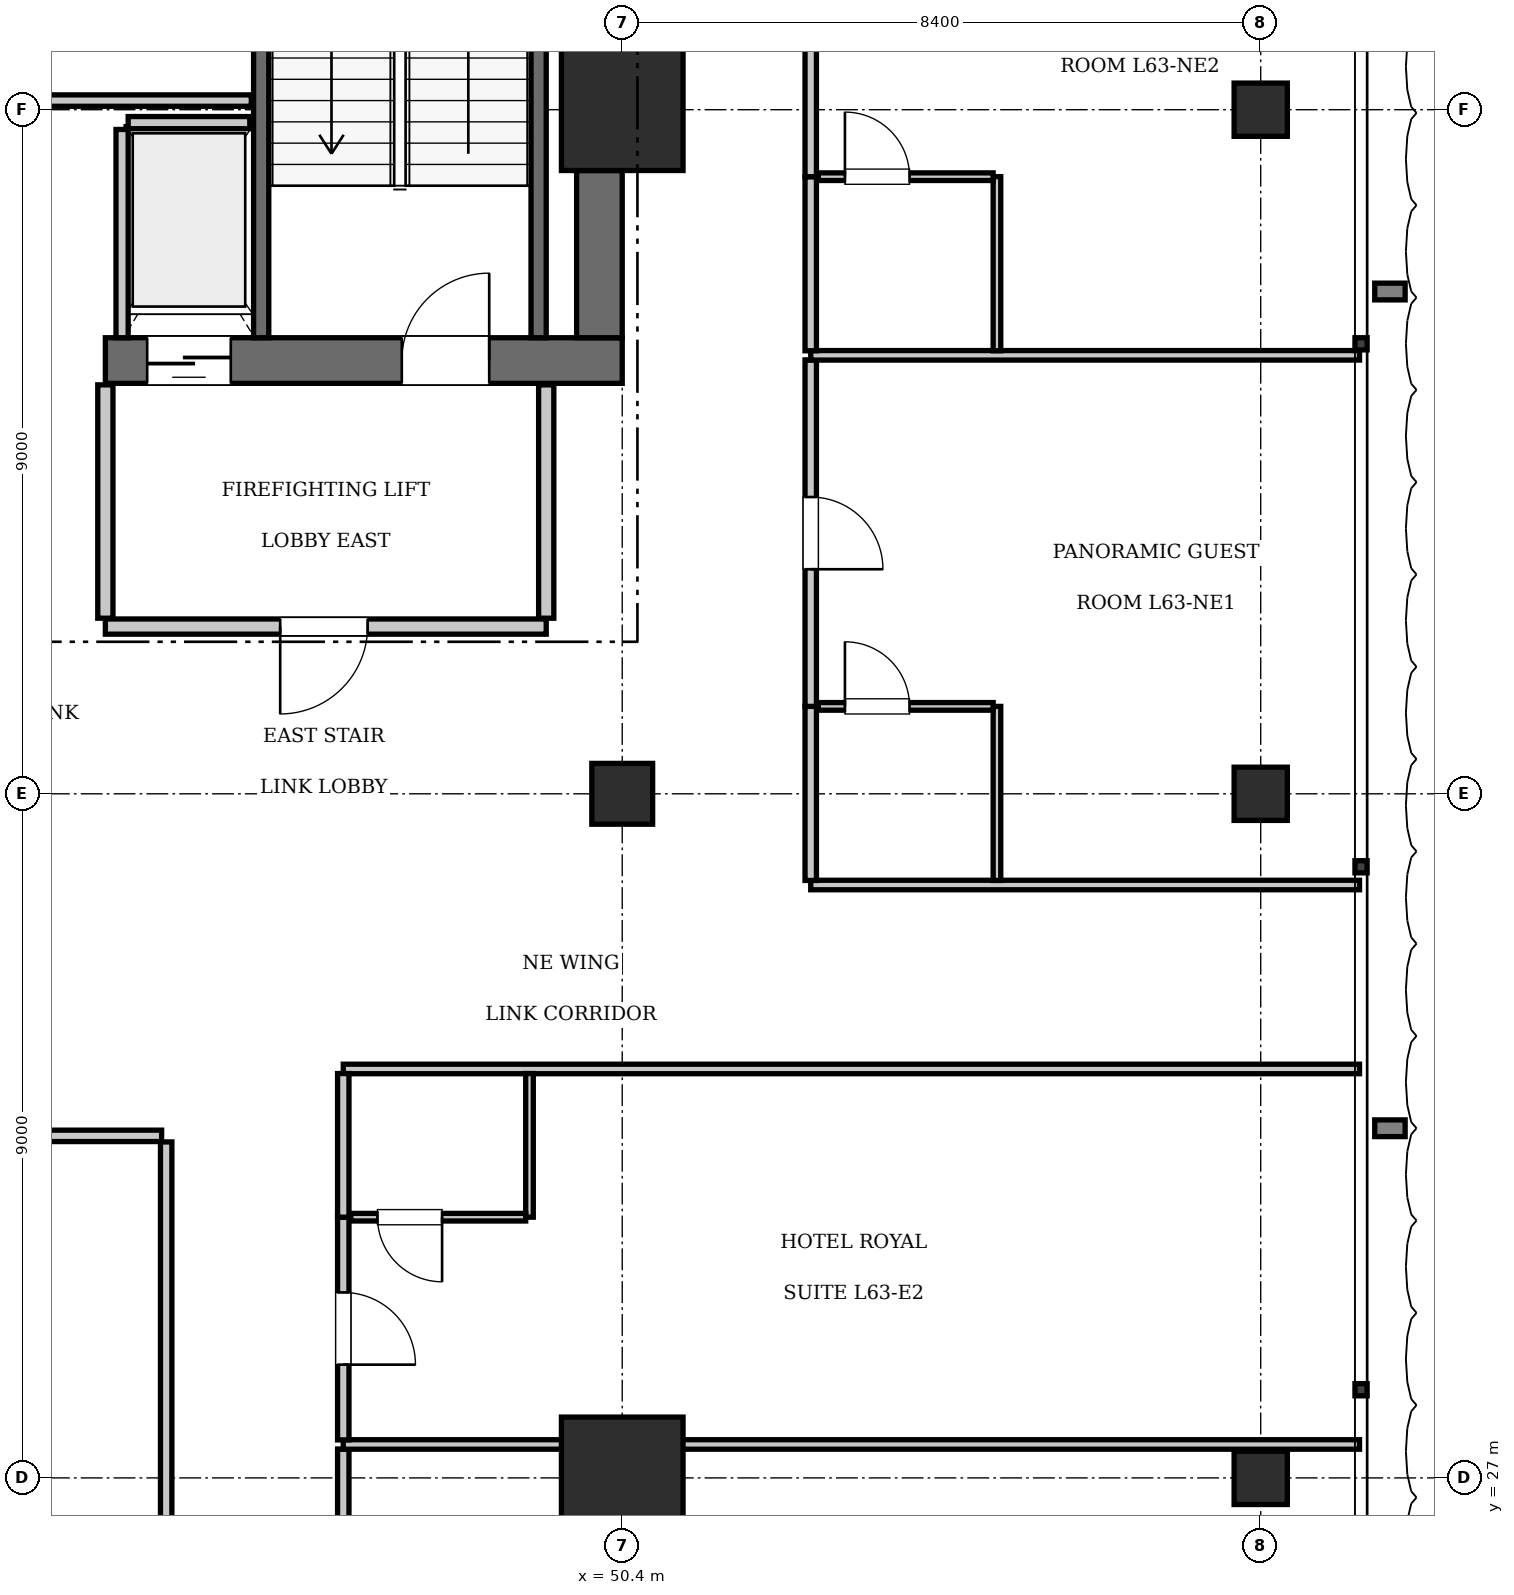
"""IFC4 building model, lengths in metres.
Left out: names, types, materials, properties, quantities, classifications, styles, units other than length and angle.
Written with IfcOpenShell. Run it as: python <this file> out.ifc"""

import sys

from ifc_helpers import new_model, si_unit, direction, frame, frame_2d, origin, origin_2d, place, context, subcontext, project, spatial, rectangle, extrude, element, fill, save


model = new_model("IFC4")
c1 = context("Model", 3, precision=1e-05, world=origin(), true_north=direction((0.0, 1.0)))
c2 = subcontext(c1, "Body", "Model", "MODEL_VIEW")
j1 = project(units=[si_unit("LENGTHUNIT", "METRE"), si_unit("PLANEANGLEUNIT", "RADIAN")], contexts=[c1])
p1 = place(None, origin())
s1 = spatial("IfcSite", under=j1, at=p1, CompositionType="ELEMENT")
p2 = place(p1, origin())
s2 = spatial("IfcBuilding", under=s1, at=p2, CompositionType="ELEMENT")
p3 = place(p2, frame((0.0, 0.0, 258.65)))
s3 = spatial("IfcBuildingStorey", under=s2, at=p3, CompositionType="ELEMENT", Elevation=258.65)
for number, where, z_axis, x_axis in (
    (1, (50.4, 27.0, 0.0), (0.0, 0.0, 1.0), (1.0, 0.0, 0.0)),
    (2, (50.4, 45.0, 0.0), (0.0, 0.0, 1.0), (1.0, 0.0, 0.0)),
):
    element("IfcColumn", number, at=place(p3, frame(where, z_axis=z_axis, x_axis=x_axis)), inside=s3, PredefinedType="COLUMN", context=c2, shape_type="SweptSolid", body=[
        extrude(rectangle(XDim=1.6, YDim=1.6, at=origin_2d()), origin(), (0.0, 0.0, 1.0), 3.85),
    ])
p4 = place(p3, frame((43.6, 41.7, 0.0), z_axis=(0.0, 0.0, 1.0), x_axis=(1.0, 0.0, 0.0)))
e3 = element("IfcWall", 3, at=p4, inside=s3, PredefinedType="SHEAR", context=c2, shape_type="SweptSolid", body=[
    extrude(rectangle(XDim=6.8, YDim=0.6, at=frame_2d((3.4, 0.0))), origin(), (0.0, 0.0, 1.0), 3.85),
])
p5 = place(p4, frame((3.9, 0.0, 0.0)))
e4 = element("IfcOpeningElement", 4, at=p5, cuts=e3, PredefinedType="OPENING", context=c2, shape_type="SweptSolid", body=[
    extrude(rectangle(XDim=1.15, YDim=2.15, at=frame_2d((0.575, 1.075))), frame((0.0, 0.31, 0.0), z_axis=(0.0, -1.0, 0.0), x_axis=(1.0, 0.0, 0.0)), (0.0, 0.0, 1.0), 0.62),
])
p6 = place(p4, frame((0.55, 0.0, 0.0)))
e5 = element("IfcOpeningElement", 5, at=p6, cuts=e3, PredefinedType="OPENING", context=c2, shape_type="SweptSolid", body=[
    extrude(rectangle(XDim=1.1, YDim=2.2, at=frame_2d((0.55, 1.1))), frame((0.0, 0.31, 0.0), z_axis=(0.0, -1.0, 0.0), x_axis=(1.0, 0.0, 0.0)), (0.0, 0.0, 1.0), 0.62),
])
p7 = place(p3, frame((50.1, 42.0, 0.0), z_axis=(0.0, 0.0, 1.0), x_axis=(0.0, 1.0, 0.0)))
e6 = element("IfcWall", 6, at=p7, inside=s3, PredefinedType="SHEAR", context=c2, shape_type="SweptSolid", body=[
    extrude(rectangle(XDim=2.2, YDim=0.6, at=frame_2d((1.1, 0.0))), origin(), (0.0, 0.0, 1.0), 3.85),
])
p8 = place(p3, frame((50.4, 36.0, 0.0), z_axis=(0.0, 0.0, 1.0), x_axis=(1.0, 0.0, 0.0)))
e7 = element("IfcColumn", 7, at=p8, inside=s3, PredefinedType="COLUMN", context=c2, shape_type="SweptSolid", body=[
    extrude(rectangle(XDim=0.8, YDim=0.8, at=origin_2d()), origin(), (0.0, 0.0, 1.0), 3.85),
])
for number, where, z_axis, x_axis in (
    (8, (58.8, 27.0, 0.0), (0.0, 0.0, 1.0), (1.0, 0.0, 0.0)),
    (9, (58.8, 36.0, 0.0), (0.0, 0.0, 1.0), (1.0, 0.0, 0.0)),
    (10, (58.8, 45.0, 0.0), (0.0, 0.0, 1.0), (1.0, 0.0, 0.0)),
):
    element("IfcColumn", number, at=place(p3, frame(where, z_axis=z_axis, x_axis=x_axis)), inside=s3, PredefinedType="COLUMN", context=c2, shape_type="SweptSolid", body=[
        extrude(rectangle(XDim=0.7, YDim=0.7, at=origin_2d()), origin(), (0.0, 0.0, 1.0), 3.85),
    ])
p9 = place(p3, frame((45.65, 42.0, 0.0), z_axis=(0.0, 0.0, 1.0), x_axis=(0.0, 1.0, 0.0)))
e11 = element("IfcWall", 11, at=p9, inside=s3, PredefinedType="SOLIDWALL", context=c2, shape_type="SweptSolid", body=[
    extrude(rectangle(XDim=9.15, YDim=0.2, at=frame_2d((4.575, 0.0))), origin(), (0.0, 0.0, 1.0), 3.61),
])
p10 = place(p3, frame((49.3, 42.0, 0.0), z_axis=(0.0, 0.0, 1.0), x_axis=(0.0, 1.0, 0.0)))
e12 = element("IfcWall", 12, at=p10, inside=s3, PredefinedType="SOLIDWALL", context=c2, shape_type="SweptSolid", body=[
    extrude(rectangle(XDim=9.12, YDim=0.2, at=frame_2d((4.56, 0.0))), origin(), (0.0, 0.0, 1.0), 3.61),
])
p11 = place(p3, frame((43.9, 44.83, 0.0), z_axis=(0.0, 0.0, 1.0), x_axis=(1.0, 0.0, 0.0)))
e13 = element("IfcWall", 13, at=p11, inside=s3, PredefinedType="SOLIDWALL", context=c2, shape_type="SweptSolid", body=[
    extrude(rectangle(XDim=1.6, YDim=0.16, at=frame_2d((0.8, 0.0))), origin(), (0.0, 0.0, 1.0), 3.61),
])
p12 = place(p3, frame((43.82, 42.0, 0.0), z_axis=(0.0, 0.0, 1.0), x_axis=(0.0, 1.0, 0.0)))
e14 = element("IfcWall", 14, at=p12, inside=s3, PredefinedType="SOLIDWALL", context=c2, shape_type="SweptSolid", body=[
    extrude(rectangle(XDim=2.74, YDim=0.16, at=frame_2d((1.37, 0.0))), origin(), (0.0, 0.0, 1.0), 3.61),
])
p13 = place(p3, frame((43.6, 38.2, 0.0), z_axis=(0.0, 0.0, 1.0), x_axis=(1.0, 0.0, 0.0)))
e15 = element("IfcWall", 15, at=p13, inside=s3, PredefinedType="PARTITIONING", context=c2, shape_type="SweptSolid", body=[
    extrude(rectangle(XDim=5.8, YDim=0.2, at=frame_2d((2.9, 0.0))), origin(), (0.0, 0.0, 1.0), 3.61),
])
p14 = place(p13, frame((2.3, 0.0, 0.0)))
e16 = element("IfcOpeningElement", 16, at=p14, cuts=e15, PredefinedType="OPENING", context=c2, shape_type="SweptSolid", body=[
    extrude(rectangle(XDim=1.15, YDim=2.15, at=frame_2d((0.575, 1.075))), frame((0.0, 0.11, 0.0), z_axis=(0.0, -1.0, 0.0), x_axis=(1.0, 0.0, 0.0)), (0.0, 0.0, 1.0), 0.22),
])
for number, where, z_axis, x_axis in (
    (17, (43.6, 38.31, 0.0), (0.0, 0.0, 1.0), (0.0, 1.0, 0.0)),
    (18, (49.4, 38.31, 0.0), (0.0, 0.0, 1.0), (0.0, 1.0, 0.0)),
):
    element("IfcWall", number, at=place(p3, frame(where, z_axis=z_axis, x_axis=x_axis)), inside=s3, PredefinedType="PARTITIONING", context=c2, shape_type="SweptSolid", body=[
        extrude(rectangle(XDim=3.07, YDim=0.2, at=frame_2d((1.535, 0.0))), origin(), (0.0, 0.0, 1.0), 3.61),
    ])
p15 = place(p3, frame((42.38, 45.12, 0.0), z_axis=(0.0, 0.0, 1.0), x_axis=(1.0, 0.0, 0.0)))
e19 = element("IfcWall", 19, at=p15, inside=s3, PredefinedType="PARTITIONING", context=c2, shape_type="SweptSolid", body=[
    extrude(rectangle(XDim=3.14, YDim=0.15, at=frame_2d((1.57, 0.0))), origin(), (0.0, 0.0, 1.0), 3.61),
])
p16 = place(p3, frame((44.4, 22.53, 0.0), z_axis=(0.0, 0.0, 1.0), x_axis=(0.0, 1.0, 0.0)))
e20 = element("IfcWall", 20, at=p16, inside=s3, PredefinedType="PARTITIONING", context=c2, shape_type="SweptSolid", body=[
    extrude(rectangle(XDim=8.89, YDim=0.15, at=frame_2d((4.445, 0.0))), origin(), (0.0, 0.0, 1.0), 3.61),
])
p17 = place(p3, frame((38.775, 31.5, 0.0), z_axis=(0.0, 0.0, 1.0), x_axis=(1.0, 0.0, 0.0)))
e21 = element("IfcWall", 21, at=p17, inside=s3, PredefinedType="PARTITIONING", context=c2, shape_type="SweptSolid", body=[
    extrude(rectangle(XDim=5.565, YDim=0.15, at=frame_2d((2.782, 0.0))), origin(), (0.0, 0.0, 1.0), 3.61),
])
p18 = place(p17, frame((2.332, 0.0, 0.0)))
e22 = element("IfcOpeningElement", 22, at=p18, cuts=e21, PredefinedType="OPENING", context=c2, shape_type="SweptSolid", body=[
    extrude(rectangle(XDim=0.9, YDim=2.1, at=frame_2d((0.45, 1.05))), frame((0.0, 0.085, 0.0), z_axis=(0.0, -1.0, 0.0), x_axis=(1.0, 0.0, 0.0)), (0.0, 0.0, 1.0), 0.17),
])
p19 = place(p3, frame((46.73, 32.38, 0.0), z_axis=(0.0, 0.0, 1.0), x_axis=(1.0, 0.0, 0.0)))
e23 = element("IfcWall", 23, at=p19, inside=s3, PredefinedType="PARTITIONING", context=c2, shape_type="SweptSolid", body=[
    extrude(rectangle(XDim=13.37, YDim=0.125, at=frame_2d((6.685, 0.0))), origin(), (0.0, 0.0, 1.0), 3.61),
])
p20 = place(p3, frame((46.73, 24.45, 0.0), z_axis=(0.0, 0.0, 1.0), x_axis=(0.0, 1.0, 0.0)))
e24 = element("IfcWall", 24, at=p20, inside=s3, PredefinedType="PARTITIONING", context=c2, shape_type="SweptSolid", body=[
    extrude(rectangle(XDim=2.93, YDim=0.15, at=frame_2d((1.465, 0.0))), origin(), (0.0, 0.0, 1.0), 3.61),
])
p21 = place(p20, frame((0.99, 0.0, 0.0)))
e25 = element("IfcOpeningElement", 25, at=p21, cuts=e24, PredefinedType="OPENING", context=c2, shape_type="SweptSolid", body=[
    extrude(rectangle(XDim=0.95, YDim=2.15, at=frame_2d((0.475, 1.075))), frame((0.0, 0.085, 0.0), z_axis=(0.0, -1.0, 0.0), x_axis=(1.0, 0.0, 0.0)), (0.0, 0.0, 1.0), 0.17),
])
p22 = place(p3, frame((46.73, 27.44, 0.0), z_axis=(0.0, 0.0, 1.0), x_axis=(1.0, 0.0, 0.0)))
e26 = element("IfcWall", 26, at=p22, inside=s3, PredefinedType="PARTITIONING", context=c2, shape_type="SweptSolid", body=[
    extrude(rectangle(XDim=13.37, YDim=0.125, at=frame_2d((6.685, 0.0))), origin(), (0.0, 0.0, 1.0), 3.61),
])
p23 = place(p3, frame((46.73, 27.5, 0.0), z_axis=(0.0, 0.0, 1.0), x_axis=(0.0, 1.0, 0.0)))
e27 = element("IfcWall", 27, at=p23, inside=s3, PredefinedType="PARTITIONING", context=c2, shape_type="SweptSolid", body=[
    extrude(rectangle(XDim=2.93, YDim=0.15, at=frame_2d((1.465, 0.0))), origin(), (0.0, 0.0, 1.0), 3.61),
])
p24 = place(p23, frame((0.99, 0.0, 0.0)))
e28 = element("IfcOpeningElement", 28, at=p24, cuts=e27, PredefinedType="OPENING", context=c2, shape_type="SweptSolid", body=[
    extrude(rectangle(XDim=0.95, YDim=2.15, at=frame_2d((0.475, 1.075))), frame((0.0, 0.085, 0.0), z_axis=(0.0, -1.0, 0.0), x_axis=(1.0, 0.0, 0.0)), (0.0, 0.0, 1.0), 0.17),
])
p25 = place(p3, frame((46.73, 30.43, 0.0), z_axis=(0.0, 0.0, 1.0), x_axis=(0.0, 1.0, 0.0)))
e29 = element("IfcWall", 29, at=p25, inside=s3, PredefinedType="PARTITIONING", context=c2, shape_type="SweptSolid", body=[
    extrude(rectangle(XDim=1.89, YDim=0.15, at=frame_2d((0.945, 0.0))), origin(), (0.0, 0.0, 1.0), 3.61),
])
p26 = place(p3, frame((49.18, 30.43, 0.0), z_axis=(0.0, 0.0, 1.0), x_axis=(0.0, 1.0, 0.0)))
e30 = element("IfcWall", 30, at=p26, inside=s3, PredefinedType="PARTITIONING", context=c2, shape_type="SweptSolid", body=[
    extrude(rectangle(XDim=1.89, YDim=0.1, at=frame_2d((0.945, 0.0))), origin(), (0.0, 0.0, 1.0), 3.61),
])
p27 = place(p3, frame((46.83, 30.43, 0.0), z_axis=(0.0, 0.0, 1.0), x_axis=(1.0, 0.0, 0.0)))
e31 = element("IfcWall", 31, at=p27, inside=s3, PredefinedType="PARTITIONING", context=c2, shape_type="SweptSolid", body=[
    extrude(rectangle(XDim=2.3, YDim=0.1, at=frame_2d((1.15, 0.0))), origin(), (0.0, 0.0, 1.0), 3.61),
])
p28 = place(p27, frame((0.35, 0.0, 0.0)))
e32 = element("IfcOpeningElement", 32, at=p28, cuts=e31, PredefinedType="OPENING", context=c2, shape_type="SweptSolid", body=[
    extrude(rectangle(XDim=0.85, YDim=2.1, at=frame_2d((0.425, 1.05))), frame((0.0, 0.06, 0.0), z_axis=(0.0, -1.0, 0.0), x_axis=(1.0, 0.0, 0.0)), (0.0, 0.0, 1.0), 0.12),
])
p29 = place(p3, frame((52.88, 34.8, 0.0), z_axis=(0.0, 0.0, 1.0), x_axis=(1.0, 0.0, 0.0)))
e33 = element("IfcWall", 33, at=p29, inside=s3, PredefinedType="PARTITIONING", context=c2, shape_type="SweptSolid", body=[
    extrude(rectangle(XDim=7.22, YDim=0.125, at=frame_2d((3.61, 0.0))), origin(), (0.0, 0.0, 1.0), 3.61),
])
p30 = place(p3, frame((52.88, 34.86, 0.0), z_axis=(0.0, 0.0, 1.0), x_axis=(0.0, 1.0, 0.0)))
e34 = element("IfcWall", 34, at=p30, inside=s3, PredefinedType="PARTITIONING", context=c2, shape_type="SweptSolid", body=[
    extrude(rectangle(XDim=2.29, YDim=0.15, at=frame_2d((1.145, 0.0))), origin(), (0.0, 0.0, 1.0), 3.61),
])
p31 = place(p3, frame((52.88, 37.15, 0.0), z_axis=(0.0, 0.0, 1.0), x_axis=(0.0, 1.0, 0.0)))
e35 = element("IfcWall", 35, at=p31, inside=s3, PredefinedType="PARTITIONING", context=c2, shape_type="SweptSolid", body=[
    extrude(rectangle(XDim=4.559, YDim=0.15, at=frame_2d((2.279, 0.0))), origin(), (0.0, 0.0, 1.0), 3.61),
])
p32 = place(p31, frame((1.804, 0.0, 0.0)))
e36 = element("IfcOpeningElement", 36, at=p32, cuts=e35, PredefinedType="OPENING", context=c2, shape_type="SweptSolid", body=[
    extrude(rectangle(XDim=0.95, YDim=2.15, at=frame_2d((0.475, 1.075))), frame((0.0, 0.085, 0.0), z_axis=(0.0, -1.0, 0.0), x_axis=(1.0, 0.0, 0.0)), (0.0, 0.0, 1.0), 0.17),
])
p33 = place(p3, frame((55.33, 34.86, 0.0), z_axis=(0.0, 0.0, 1.0), x_axis=(0.0, 1.0, 0.0)))
e37 = element("IfcWall", 37, at=p33, inside=s3, PredefinedType="PARTITIONING", context=c2, shape_type="SweptSolid", body=[
    extrude(rectangle(XDim=2.29, YDim=0.1, at=frame_2d((1.145, 0.0))), origin(), (0.0, 0.0, 1.0), 3.61),
])
p34 = place(p3, frame((52.98, 37.15, 0.0), z_axis=(0.0, 0.0, 1.0), x_axis=(1.0, 0.0, 0.0)))
e38 = element("IfcWall", 38, at=p34, inside=s3, PredefinedType="PARTITIONING", context=c2, shape_type="SweptSolid", body=[
    extrude(rectangle(XDim=2.3, YDim=0.1, at=frame_2d((1.15, 0.0))), origin(), (0.0, 0.0, 1.0), 3.61),
])
p35 = place(p34, frame((0.35, 0.0, 0.0)))
e39 = element("IfcOpeningElement", 39, at=p35, cuts=e38, PredefinedType="OPENING", context=c2, shape_type="SweptSolid", body=[
    extrude(rectangle(XDim=0.85, YDim=2.1, at=frame_2d((0.425, 1.05))), frame((0.0, 0.06, 0.0), z_axis=(0.0, -1.0, 0.0), x_axis=(1.0, 0.0, 0.0)), (0.0, 0.0, 1.0), 0.12),
])
p36 = place(p3, frame((52.88, 41.769, 0.0), z_axis=(0.0, 0.0, 1.0), x_axis=(1.0, 0.0, 0.0)))
e40 = element("IfcWall", 40, at=p36, inside=s3, PredefinedType="PARTITIONING", context=c2, shape_type="SweptSolid", body=[
    extrude(rectangle(XDim=7.22, YDim=0.125, at=frame_2d((3.61, 0.0))), origin(), (0.0, 0.0, 1.0), 3.61),
])
p37 = place(p3, frame((52.88, 41.829, 0.0), z_axis=(0.0, 0.0, 1.0), x_axis=(0.0, 1.0, 0.0)))
e41 = element("IfcWall", 41, at=p37, inside=s3, PredefinedType="PARTITIONING", context=c2, shape_type="SweptSolid", body=[
    extrude(rectangle(XDim=2.29, YDim=0.15, at=frame_2d((1.145, 0.0))), origin(), (0.0, 0.0, 1.0), 3.61),
])
p38 = place(p3, frame((52.88, 44.119, 0.0), z_axis=(0.0, 0.0, 1.0), x_axis=(0.0, 1.0, 0.0)))
e42 = element("IfcWall", 42, at=p38, inside=s3, PredefinedType="PARTITIONING", context=c2, shape_type="SweptSolid", body=[
    extrude(rectangle(XDim=4.559, YDim=0.15, at=frame_2d((2.279, 0.0))), origin(), (0.0, 0.0, 1.0), 3.61),
])
p39 = place(p38, frame((1.804, 0.0, 0.0)))
e43 = element("IfcOpeningElement", 43, at=p39, cuts=e42, PredefinedType="OPENING", context=c2, shape_type="SweptSolid", body=[
    extrude(rectangle(XDim=0.95, YDim=2.15, at=frame_2d((0.475, 1.075))), frame((0.0, 0.085, 0.0), z_axis=(0.0, -1.0, 0.0), x_axis=(1.0, 0.0, 0.0)), (0.0, 0.0, 1.0), 0.17),
])
p40 = place(p3, frame((55.33, 41.829, 0.0), z_axis=(0.0, 0.0, 1.0), x_axis=(0.0, 1.0, 0.0)))
e44 = element("IfcWall", 44, at=p40, inside=s3, PredefinedType="PARTITIONING", context=c2, shape_type="SweptSolid", body=[
    extrude(rectangle(XDim=2.29, YDim=0.1, at=frame_2d((1.145, 0.0))), origin(), (0.0, 0.0, 1.0), 3.61),
])
p41 = place(p3, frame((52.98, 44.119, 0.0), z_axis=(0.0, 0.0, 1.0), x_axis=(1.0, 0.0, 0.0)))
e45 = element("IfcWall", 45, at=p41, inside=s3, PredefinedType="PARTITIONING", context=c2, shape_type="SweptSolid", body=[
    extrude(rectangle(XDim=2.3, YDim=0.1, at=frame_2d((1.15, 0.0))), origin(), (0.0, 0.0, 1.0), 3.61),
])
p42 = place(p41, frame((0.35, 0.0, 0.0)))
e46 = element("IfcOpeningElement", 46, at=p42, cuts=e45, PredefinedType="OPENING", context=c2, shape_type="SweptSolid", body=[
    extrude(rectangle(XDim=0.85, YDim=2.1, at=frame_2d((0.425, 1.05))), frame((0.0, 0.06, 0.0), z_axis=(0.0, -1.0, 0.0), x_axis=(1.0, 0.0, 0.0)), (0.0, 0.0, 1.0), 0.12),
])
p43 = place(p5, origin())
e47 = element("IfcDoor", 47, at=p43, inside=s3, OperationType="SINGLE_SWING_RIGHT", PredefinedType="DOOR", context=c2, shape_type="SweptSolid", body=[
    extrude(rectangle(XDim=1.15, YDim=2.15, at=frame_2d((0.575, 1.075))), frame((0.0, 0.025, 0.0), z_axis=(0.0, -1.0, 0.0), x_axis=(1.0, 0.0, 0.0)), (0.0, 0.0, 1.0), 0.05),
])
fill(e4, e47)
p44 = place(p6, frame((1.1, 0.0, 0.0), z_axis=(0.0, 0.0, 1.0), x_axis=(-1.0, 0.0, 0.0)))
e48 = element("IfcDoor", 48, at=p44, inside=s3, OperationType="SLIDING_TO_LEFT", PredefinedType="DOOR", context=c2, shape_type="SweptSolid", body=[
    extrude(rectangle(XDim=1.1, YDim=2.2, at=frame_2d((0.55, 1.1))), frame((0.0, 0.025, 0.0), z_axis=(0.0, -1.0, 0.0), x_axis=(1.0, 0.0, 0.0)), (0.0, 0.0, 1.0), 0.05),
])
fill(e5, e48)
p45 = place(p14, frame((1.15, 0.0, 0.0), z_axis=(0.0, 0.0, 1.0), x_axis=(-1.0, 0.0, 0.0)))
e49 = element("IfcDoor", 49, at=p45, inside=s3, OperationType="SINGLE_SWING_RIGHT", PredefinedType="DOOR", context=c2, shape_type="SweptSolid", body=[
    extrude(rectangle(XDim=1.15, YDim=2.15, at=frame_2d((0.575, 1.075))), frame((0.0, 0.025, 0.0), z_axis=(0.0, -1.0, 0.0), x_axis=(1.0, 0.0, 0.0)), (0.0, 0.0, 1.0), 0.05),
])
fill(e16, e49)
p46 = place(p28, frame((0.85, 0.0, 0.0), z_axis=(0.0, 0.0, 1.0), x_axis=(-1.0, 0.0, 0.0)))
e50 = element("IfcDoor", 50, at=p46, inside=s3, OperationType="SINGLE_SWING_LEFT", PredefinedType="DOOR", context=c2, shape_type="SweptSolid", body=[
    extrude(rectangle(XDim=0.85, YDim=2.1, at=frame_2d((0.425, 1.05))), frame((0.0, 0.025, 0.0), z_axis=(0.0, -1.0, 0.0), x_axis=(1.0, 0.0, 0.0)), (0.0, 0.0, 1.0), 0.05),
])
fill(e32, e50)
p47 = place(p24, frame((0.95, 0.0, 0.0), z_axis=(0.0, 0.0, 1.0), x_axis=(-1.0, 0.0, 0.0)))
e51 = element("IfcDoor", 51, at=p47, inside=s3, OperationType="SINGLE_SWING_RIGHT", PredefinedType="DOOR", context=c2, shape_type="SweptSolid", body=[
    extrude(rectangle(XDim=0.95, YDim=2.15, at=frame_2d((0.475, 1.075))), frame((0.0, 0.025, 0.0), z_axis=(0.0, -1.0, 0.0), x_axis=(1.0, 0.0, 0.0)), (0.0, 0.0, 1.0), 0.05),
])
fill(e28, e51)
p48 = place(p35, origin())
e52 = element("IfcDoor", 52, at=p48, inside=s3, OperationType="SINGLE_SWING_LEFT", PredefinedType="DOOR", context=c2, shape_type="SweptSolid", body=[
    extrude(rectangle(XDim=0.85, YDim=2.1, at=frame_2d((0.425, 1.05))), frame((0.0, 0.025, 0.0), z_axis=(0.0, -1.0, 0.0), x_axis=(1.0, 0.0, 0.0)), (0.0, 0.0, 1.0), 0.05),
])
fill(e39, e52)
p49 = place(p32, frame((0.95, 0.0, 0.0), z_axis=(0.0, 0.0, 1.0), x_axis=(-1.0, 0.0, 0.0)))
e53 = element("IfcDoor", 53, at=p49, inside=s3, OperationType="SINGLE_SWING_RIGHT", PredefinedType="DOOR", context=c2, shape_type="SweptSolid", body=[
    extrude(rectangle(XDim=0.95, YDim=2.15, at=frame_2d((0.475, 1.075))), frame((0.0, 0.025, 0.0), z_axis=(0.0, -1.0, 0.0), x_axis=(1.0, 0.0, 0.0)), (0.0, 0.0, 1.0), 0.05),
])
fill(e36, e53)
p50 = place(p42, origin())
e54 = element("IfcDoor", 54, at=p50, inside=s3, OperationType="SINGLE_SWING_LEFT", PredefinedType="DOOR", context=c2, shape_type="SweptSolid", body=[
    extrude(rectangle(XDim=0.85, YDim=2.1, at=frame_2d((0.425, 1.05))), frame((0.0, 0.025, 0.0), z_axis=(0.0, -1.0, 0.0), x_axis=(1.0, 0.0, 0.0)), (0.0, 0.0, 1.0), 0.05),
])
fill(e46, e54)
save(model, sys.argv[1])
